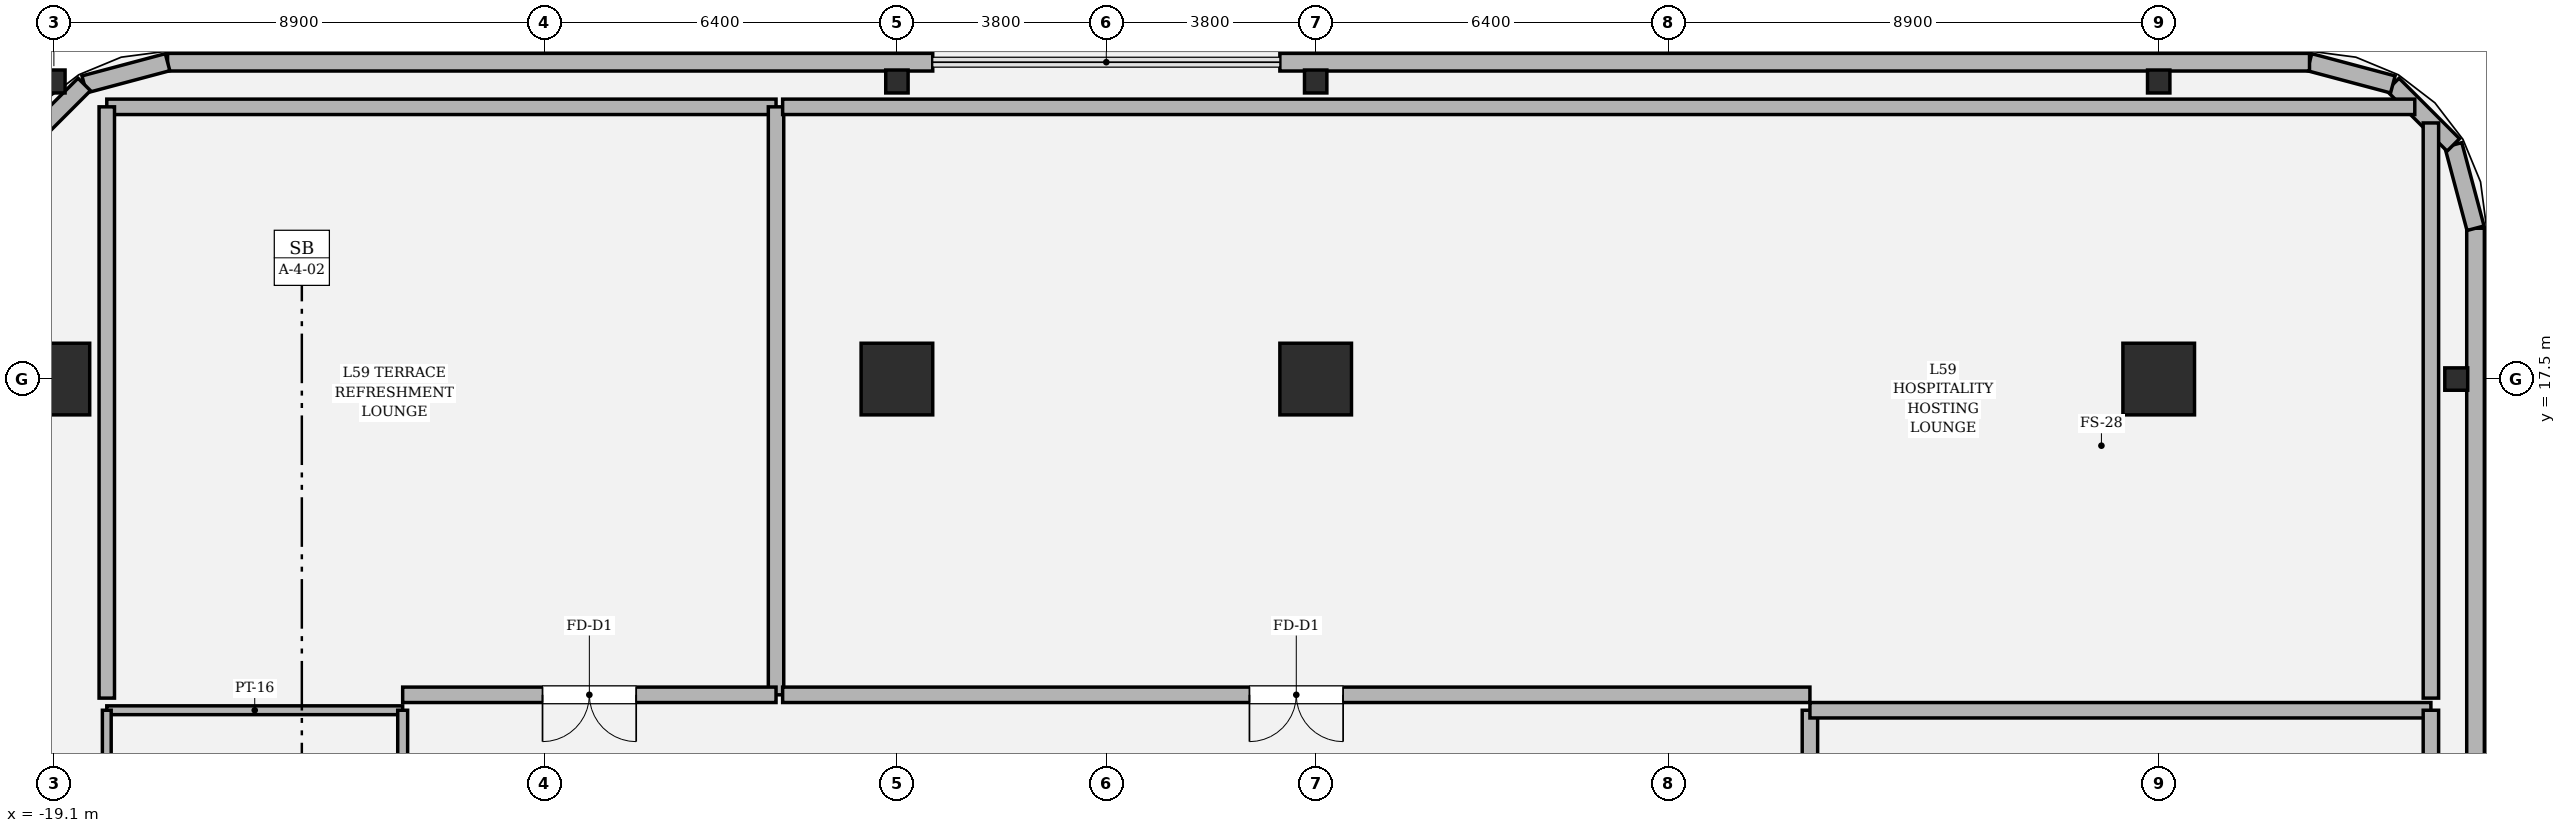
"""IFC4 building model, lengths in metres.
Left out: names, types, materials, properties, quantities, classifications, styles, units other than length and angle.
Written with IfcOpenShell. Run it as: python <this file> out.ifc"""

import sys

from ifc_helpers import new_model, si_unit, direction, frame, frame_2d, origin, origin_2d, place, context, subcontext, project, spatial, rectangle, hollow_rectangle, i_section, extrude, element, fill, save


model = new_model("IFC4")
c1 = context("Model", 3, precision=1e-05, world=origin(), true_north=direction((0.0, 1.0)))
c2 = subcontext(c1, "Body", "Model", "MODEL_VIEW")
j1 = project(units=[si_unit("LENGTHUNIT", "METRE"), si_unit("PLANEANGLEUNIT", "RADIAN")], contexts=[c1])
p1 = place(None, origin())
s1 = spatial("IfcSite", under=j1, at=p1, CompositionType="ELEMENT")
p2 = place(p1, origin())
s2 = spatial("IfcBuilding", under=s1, at=p2, CompositionType="ELEMENT")
p3 = place(p2, frame((0.0, 0.0, 251.4)))
s3 = spatial("IfcBuildingStorey", under=s2, at=p3, CompositionType="ELEMENT", Elevation=251.4)
for number, where, z_axis, x_axis in (
    (1, (19.1, 17.5, 0.0), (0.0, 0.0, 1.0), (1.0, 0.0, 0.0)),
    (2, (3.8, 17.5, 0.0), (0.0, 0.0, 1.0), (1.0, 0.0, 0.0)),
    (3, (-3.8, 17.5, 0.0), (0.0, 0.0, 1.0), (1.0, 0.0, 0.0)),
    (4, (-19.1, 17.5, 0.0), (0.0, 0.0, 1.0), (1.0, 0.0, 0.0)),
):
    element("IfcColumn", number, at=place(p3, frame(where, z_axis=z_axis, x_axis=x_axis)), inside=s3, PredefinedType="COLUMN", context=c2, shape_type="SweptSolid", body=[
        extrude(hollow_rectangle(XDim=1.3, YDim=1.3, WallThickness=0.038, at=origin_2d()), origin(), (0.0, 0.0, 1.0), 4.05),
    ])
for number, where, z_axis, x_axis in (
    (5, (-19.1, 22.9, 0.0), (0.0, 0.0, 1.0), (1.0, 0.0, 0.0)),
    (6, (-3.8, 22.9, 0.0), (0.0, 0.0, 1.0), (1.0, 0.0, 0.0)),
    (7, (3.8, 22.9, 0.0), (0.0, 0.0, 1.0), (1.0, 0.0, 0.0)),
    (8, (19.1, 22.9, 0.0), (0.0, 0.0, 1.0), (1.0, 0.0, 0.0)),
    (9, (24.5, 17.5, 0.0), (0.0, 0.0, 1.0), (0.0, 1.0, 0.0)),
):
    element("IfcColumn", number, at=place(p3, frame(where, z_axis=z_axis, x_axis=x_axis)), inside=s3, PredefinedType="COLUMN", context=c2, shape_type="SweptSolid", body=[
        extrude(i_section(OverallWidth=0.406, OverallDepth=0.416, WebThickness=0.029, FlangeThickness=0.048, FilletRadius=0.018, at=origin_2d()), origin(), (0.0, 0.0, 1.0), 4.048),
    ])
p4 = place(p3, frame((24.85, 2.75, 0.0), z_axis=(0.0, 0.0, 1.0), x_axis=(0.0, 1.0, 0.0)))
e10 = element("IfcWall", 10, at=p4, inside=s3, PredefinedType="SOLIDWALL", context=c2, shape_type="SweptSolid", body=[
    extrude(rectangle(XDim=17.487, YDim=0.32, at=frame_2d((8.743, 0.0))), origin(), (0.0, 0.0, 1.0), 2.564),
])
p5 = place(p3, frame((24.85, 20.237, 0.0), z_axis=(0.0, 0.0, 1.0), x_axis=(-0.257847112249, 0.966185730957, 0.0)))
e11 = element("IfcWall", 11, at=p5, inside=s3, PredefinedType="SOLIDWALL", context=c2, shape_type="SweptSolid", body=[
    extrude(rectangle(XDim=1.565, YDim=0.32, at=frame_2d((0.783, 0.0))), origin(), (0.0, 0.0, 1.0), 3.85),
])
p6 = place(p3, frame((24.447, 21.749, 0.0), z_axis=(0.0, 0.0, 1.0), x_axis=(-0.707028130747, 0.707185422879, 0.0)))
e12 = element("IfcWall", 12, at=p6, inside=s3, PredefinedType="SOLIDWALL", context=c2, shape_type="SweptSolid", body=[
    extrude(rectangle(XDim=1.552, YDim=0.32, at=frame_2d((0.776, 0.0))), origin(), (0.0, 0.0, 1.0), 3.85),
])
p7 = place(p3, frame((23.349, 22.847, 0.0), z_axis=(0.0, 0.0, 1.0), x_axis=(-0.966224582397, 0.257701486942, 0.0)))
e13 = element("IfcWall", 13, at=p7, inside=s3, PredefinedType="SOLIDWALL", context=c2, shape_type="SweptSolid", body=[
    extrude(rectangle(XDim=1.565, YDim=0.32, at=frame_2d((0.783, 0.0))), origin(), (0.0, 0.0, 1.0), 3.85),
])
p8 = place(p3, frame((21.837, 23.25, 0.0), z_axis=(0.0, 0.0, 1.0), x_axis=(-1.0, 0.0, 0.0)))
e14 = element("IfcWall", 14, at=p8, inside=s3, PredefinedType="SOLIDWALL", context=c2, shape_type="SweptSolid", body=[
    extrude(rectangle(XDim=18.687, YDim=0.32, at=frame_2d((9.344, 0.0))), origin(), (0.0, 0.0, 1.0), 2.564),
])
p9 = place(p3, frame((-3.15, 23.25, 0.0), z_axis=(0.0, 0.0, 1.0), x_axis=(-1.0, 0.0, 0.0)))
e15 = element("IfcWall", 15, at=p9, inside=s3, PredefinedType="SOLIDWALL", context=c2, shape_type="SweptSolid", body=[
    extrude(rectangle(XDim=13.887, YDim=0.32, at=frame_2d((6.943, 0.0))), origin(), (0.0, 0.0, 1.0), 2.564),
])
p10 = place(p3, frame((-17.037, 23.25, 0.0), z_axis=(0.0, 0.0, 1.0), x_axis=(-0.966224582397, -0.257701486942, 0.0)))
e16 = element("IfcWall", 16, at=p10, inside=s3, PredefinedType="SOLIDWALL", context=c2, shape_type="SweptSolid", body=[
    extrude(rectangle(XDim=1.565, YDim=0.32, at=frame_2d((0.783, 0.0))), origin(), (0.0, 0.0, 1.0), 2.564),
])
p11 = place(p3, frame((-18.549, 22.847, 0.0), z_axis=(0.0, 0.0, 1.0), x_axis=(-0.707028130747, -0.707185422879, 0.0)))
e17 = element("IfcWall", 17, at=p11, inside=s3, PredefinedType="SOLIDWALL", context=c2, shape_type="SweptSolid", body=[
    extrude(rectangle(XDim=1.552, YDim=0.32, at=frame_2d((0.776, 0.0))), origin(), (0.0, 0.0, 1.0), 2.524),
])
p12 = place(p3, frame((-18.14, 11.49, 0.0), z_axis=(0.0, 0.0, 1.0), x_axis=(1.0, 0.0, 0.0)))
e18 = element("IfcWall", 18, at=p12, inside=s3, PredefinedType="PARTITIONING", context=c2, shape_type="SweptSolid", body=[
    extrude(rectangle(XDim=5.37, YDim=0.16, at=frame_2d((2.685, 0.0))), origin(), (0.0, 0.0, 1.0), 3.484),
])
p13 = place(p3, frame((-12.77, 11.49, 0.0), z_axis=(0.0, 0.0, 1.0), x_axis=(0.0, -1.0, 0.0)))
e19 = element("IfcWall", 19, at=p13, inside=s3, PredefinedType="PARTITIONING", context=c2, shape_type="SweptSolid", body=[
    extrude(rectangle(XDim=8.658, YDim=0.18, at=frame_2d((4.329, 0.0))), origin(), (0.0, 0.0, 1.0), 3.244),
])
p14 = place(p13, frame((3.804, 0.0, 0.0)))
e20 = element("IfcOpeningElement", 20, at=p14, cuts=e19, PredefinedType="OPENING", context=c2, shape_type="SweptSolid", body=[
    extrude(rectangle(XDim=1.05, YDim=2.2, at=frame_2d((0.525, 1.1))), frame((0.0, 0.1, 0.0), z_axis=(0.0, -1.0, 0.0), x_axis=(1.0, 0.0, 0.0)), (0.0, 0.0, 1.0), 0.2),
])
p15 = place(p3, frame((-18.14, 2.832, 0.0), z_axis=(0.0, 0.0, 1.0), x_axis=(0.0, 1.0, 0.0)))
e21 = element("IfcWall", 21, at=p15, inside=s3, PredefinedType="PARTITIONING", context=c2, shape_type="SweptSolid", body=[
    extrude(rectangle(XDim=8.658, YDim=0.16, at=frame_2d((4.329, 0.0))), origin(), (0.0, 0.0, 1.0), 3.244),
])
p16 = place(p3, frame((12.77, 2.832, 0.0), z_axis=(0.0, 0.0, 1.0), x_axis=(0.0, 1.0, 0.0)))
e22 = element("IfcWall", 22, at=p16, inside=s3, PredefinedType="SOLIDWALL", context=c2, shape_type="SweptSolid", body=[
    extrude(rectangle(XDim=8.658, YDim=0.28, at=frame_2d((4.329, 0.0))), origin(), (0.0, 0.0, 1.0), 3.244),
])
p17 = place(p16, frame((3.479, 0.0, 0.0)))
e23 = element("IfcOpeningElement", 23, at=p17, cuts=e22, PredefinedType="OPENING", context=c2, shape_type="SweptSolid", body=[
    extrude(rectangle(XDim=1.7, YDim=2.3, at=frame_2d((0.85, 1.15))), frame((0.0, 0.15, 0.0), z_axis=(0.0, -1.0, 0.0), x_axis=(1.0, 0.0, 0.0)), (0.0, 0.0, 1.0), 0.3),
])
p18 = place(p3, frame((12.77, 11.49, 0.0), z_axis=(0.0, 0.0, 1.0), x_axis=(1.0, 0.0, 0.0)))
e24 = element("IfcWall", 24, at=p18, inside=s3, PredefinedType="SOLIDWALL", context=c2, shape_type="SweptSolid", body=[
    extrude(rectangle(XDim=11.27, YDim=0.28, at=frame_2d((5.635, 0.0))), origin(), (0.0, 0.0, 1.0), 3.244),
])
p19 = place(p3, frame((24.04, 11.49, 0.0), z_axis=(0.0, 0.0, 1.0), x_axis=(0.0, -1.0, 0.0)))
e25 = element("IfcWall", 25, at=p19, inside=s3, PredefinedType="SOLIDWALL", context=c2, shape_type="SweptSolid", body=[
    extrude(rectangle(XDim=8.658, YDim=0.28, at=frame_2d((4.329, 0.0))), origin(), (0.0, 0.0, 1.0), 2.524),
])
p20 = place(p3, frame((-18.14, 22.44, 0.0), z_axis=(0.0, 0.0, 1.0), x_axis=(1.0, 0.0, 0.0)))
e26 = element("IfcWall", 26, at=p20, inside=s3, PredefinedType="SOLIDWALL", context=c2, shape_type="SweptSolid", body=[
    extrude(rectangle(XDim=12.146, YDim=0.28, at=frame_2d((6.073, 0.0))), origin(), (0.0, 0.0, 1.0), 3.85),
])
p21 = place(p3, frame((-5.994, 22.44, 0.0), z_axis=(0.0, 0.0, 1.0), x_axis=(0.0, -1.0, 0.0)))
e27 = element("IfcWall", 27, at=p21, inside=s3, PredefinedType="SOLIDWALL", context=c2, shape_type="SweptSolid", body=[
    extrude(rectangle(XDim=10.67, YDim=0.28, at=frame_2d((5.335, 0.0))), origin(), (0.0, 0.0, 1.0), 3.244),
])
p22 = place(p3, frame((-5.994, 11.77, 0.0), z_axis=(0.0, 0.0, 1.0), x_axis=(-1.0, 0.0, 0.0)))
e28 = element("IfcWall", 28, at=p22, inside=s3, PredefinedType="SOLIDWALL", context=c2, shape_type="SweptSolid", body=[
    extrude(rectangle(XDim=6.776, YDim=0.28, at=frame_2d((3.388, 0.0))), origin(), (0.0, 0.0, 1.0), 3.244),
])
p23 = place(p22, frame((2.538, 0.0, 0.0)))
e29 = element("IfcOpeningElement", 29, at=p23, cuts=e28, PredefinedType="OPENING", context=c2, shape_type="SweptSolid", body=[
    extrude(rectangle(XDim=1.7, YDim=2.3, at=frame_2d((0.85, 1.15))), frame((0.0, 0.15, 0.0), z_axis=(0.0, -1.0, 0.0), x_axis=(1.0, 0.0, 0.0)), (0.0, 0.0, 1.0), 0.3),
])
p24 = place(p3, frame((-18.14, 11.71, 0.0), z_axis=(0.0, 0.0, 1.0), x_axis=(0.0, 1.0, 0.0)))
e30 = element("IfcWall", 30, at=p24, inside=s3, PredefinedType="SOLIDWALL", context=c2, shape_type="SweptSolid", body=[
    extrude(rectangle(XDim=10.73, YDim=0.28, at=frame_2d((5.365, 0.0))), origin(), (0.0, 0.0, 1.0), 3.244),
])
p25 = place(p3, frame((12.77, 11.77, 0.0), z_axis=(0.0, 0.0, 1.0), x_axis=(-1.0, 0.0, 0.0)))
e31 = element("IfcWall", 31, at=p25, inside=s3, PredefinedType="SOLIDWALL", context=c2, shape_type="SweptSolid", body=[
    extrude(rectangle(XDim=18.644, YDim=0.28, at=frame_2d((9.322, 0.0))), origin(), (0.0, 0.0, 1.0), 3.244),
])
p26 = place(p25, frame((8.472, 0.0, 0.0)))
e32 = element("IfcOpeningElement", 32, at=p26, cuts=e31, PredefinedType="OPENING", context=c2, shape_type="SweptSolid", body=[
    extrude(rectangle(XDim=1.7, YDim=2.3, at=frame_2d((0.85, 1.15))), frame((0.0, 0.15, 0.0), z_axis=(0.0, -1.0, 0.0), x_axis=(1.0, 0.0, 0.0)), (0.0, 0.0, 1.0), 0.3),
])
p27 = place(p3, frame((-5.874, 22.44, 0.0), z_axis=(0.0, 0.0, 1.0), x_axis=(1.0, 0.0, 0.0)))
e33 = element("IfcWall", 33, at=p27, inside=s3, PredefinedType="SOLIDWALL", context=c2, shape_type="SweptSolid", body=[
    extrude(rectangle(XDim=29.622, YDim=0.28, at=frame_2d((14.811, 0.0))), origin(), (0.0, 0.0, 1.0), 2.524),
])
p28 = place(p3, frame((24.04, 22.147, 0.0), z_axis=(0.0, 0.0, 1.0), x_axis=(0.0, -1.0, 0.0)))
e34 = element("IfcWall", 34, at=p28, inside=s3, PredefinedType="SOLIDWALL", context=c2, shape_type="SweptSolid", body=[
    extrude(rectangle(XDim=10.438, YDim=0.28, at=frame_2d((5.219, 0.0))), origin(), (0.0, 0.0, 1.0), 2.524),
])
p29 = place(p23, origin())
e35 = element("IfcDoor", 35, at=p29, inside=s3, OperationType="DOUBLE_DOOR_SINGLE_SWING", PredefinedType="DOOR", context=c2, shape_type="SweptSolid", body=[
    extrude(rectangle(XDim=1.7, YDim=2.3, at=frame_2d((0.85, 1.15))), frame((0.0, 0.025, 0.0), z_axis=(0.0, -1.0, 0.0), x_axis=(1.0, 0.0, 0.0)), (0.0, 0.0, 1.0), 0.05),
])
fill(e29, e35)
p30 = place(p26, origin())
e36 = element("IfcDoor", 36, at=p30, inside=s3, OperationType="DOUBLE_DOOR_SINGLE_SWING", PredefinedType="DOOR", context=c2, shape_type="SweptSolid", body=[
    extrude(rectangle(XDim=1.7, YDim=2.3, at=frame_2d((0.85, 1.15))), frame((0.0, 0.025, 0.0), z_axis=(0.0, -1.0, 0.0), x_axis=(1.0, 0.0, 0.0)), (0.0, 0.0, 1.0), 0.05),
])
fill(e32, e36)
save(model, sys.argv[1])
